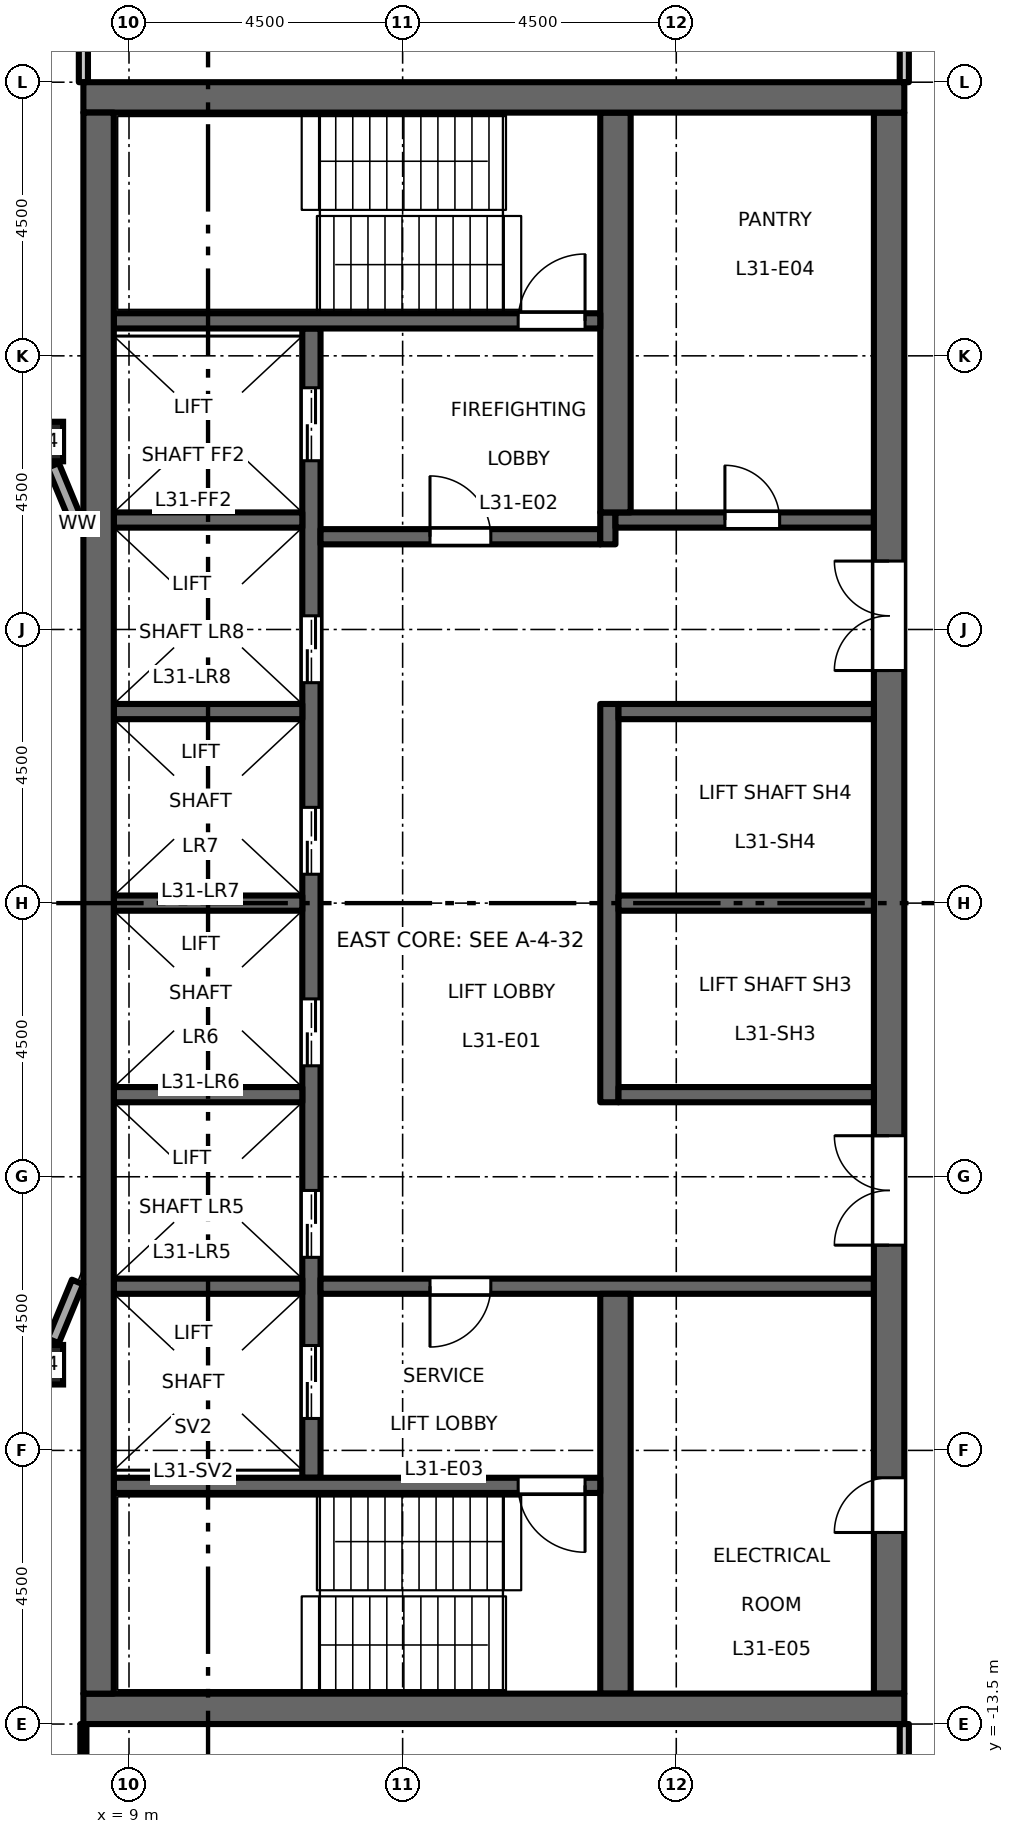
"""IFC4 building model, lengths in metres.
Left out: names, types, materials, properties, quantities, classifications, styles, units other than length and angle.
Written with IfcOpenShell. Run it as: python <this file> out.ifc"""

import sys

from ifc_helpers import new_model, si_unit, direction, frame, frame_2d, origin, origin_2d, place, context, subcontext, project, spatial, rectangle, hollow_rectangle, extrude, element, fill, save


model = new_model("IFC4")
c1 = context("Model", 3, precision=1e-05, world=origin(), true_north=direction((0.0, 1.0)))
c2 = subcontext(c1, "Body", "Model", "MODEL_VIEW")
j1 = project(units=[si_unit("LENGTHUNIT", "METRE"), si_unit("PLANEANGLEUNIT", "RADIAN")], contexts=[c1])
p1 = place(None, origin())
s1 = spatial("IfcSite", under=j1, at=p1, CompositionType="ELEMENT")
p2 = place(p1, origin())
s2 = spatial("IfcBuilding", under=s1, at=p2, CompositionType="ELEMENT")
p3 = place(p2, frame((0.0, 0.0, 145.2)))
s3 = spatial("IfcBuildingStorey", under=s2, at=p3, CompositionType="ELEMENT", Elevation=145.2)
for number, where, z_axis, x_axis in (
    (1, (7.591, -7.591, 0.0), (0.0, 0.0, 1.0), (1.0, 0.0, 0.0)),
    (2, (7.591, 7.591, 0.0), (0.0, 0.0, 1.0), (1.0, 0.0, 0.0)),
):
    element("IfcColumn", number, at=place(p3, frame(where, z_axis=z_axis, x_axis=x_axis)), inside=s3, PredefinedType="COLUMN", context=c2, shape_type="SweptSolid", body=[
        extrude(hollow_rectangle(XDim=0.65, YDim=0.65, WallThickness=0.036, at=origin_2d()), origin(), (0.0, 0.0, 1.0), 4.5),
    ])
p4 = place(p3, frame((12.0, -9.45, 0.0), z_axis=(0.0, 0.0, 1.0), x_axis=(0.0, 1.0, 0.0)))
e3 = element("IfcWall", 3, at=p4, inside=s3, PredefinedType="SHEAR", context=c2, shape_type="SweptSolid", body=[
    extrude(rectangle(XDim=18.9, YDim=0.3, at=frame_2d((9.45, 0.0))), origin(), (0.0, 0.0, 1.0), 4.35),
])
p5 = place(p4, frame((3.625, 0.0, 0.0)))
e4 = element("IfcOpeningElement", 4, at=p5, cuts=e3, PredefinedType="OPENING", context=c2, shape_type="SweptSolid", body=[
    extrude(rectangle(XDim=1.1, YDim=2.1, at=frame_2d((0.55, 1.05))), frame((0.0, 0.16, 0.0), z_axis=(0.0, -1.0, 0.0), x_axis=(1.0, 0.0, 0.0)), (0.0, 0.0, 1.0), 0.32),
])
p6 = place(p4, frame((6.775, 0.0, 0.0)))
e5 = element("IfcOpeningElement", 5, at=p6, cuts=e3, PredefinedType="OPENING", context=c2, shape_type="SweptSolid", body=[
    extrude(rectangle(XDim=1.1, YDim=2.1, at=frame_2d((0.55, 1.05))), frame((0.0, 0.16, 0.0), z_axis=(0.0, -1.0, 0.0), x_axis=(1.0, 0.0, 0.0)), (0.0, 0.0, 1.0), 0.32),
])
p7 = place(p4, frame((9.925, 0.0, 0.0)))
e6 = element("IfcOpeningElement", 6, at=p7, cuts=e3, PredefinedType="OPENING", context=c2, shape_type="SweptSolid", body=[
    extrude(rectangle(XDim=1.1, YDim=2.1, at=frame_2d((0.55, 1.05))), frame((0.0, 0.16, 0.0), z_axis=(0.0, -1.0, 0.0), x_axis=(1.0, 0.0, 0.0)), (0.0, 0.0, 1.0), 0.32),
])
p8 = place(p4, frame((13.075, 0.0, 0.0)))
e7 = element("IfcOpeningElement", 7, at=p8, cuts=e3, PredefinedType="OPENING", context=c2, shape_type="SweptSolid", body=[
    extrude(rectangle(XDim=1.1, YDim=2.1, at=frame_2d((0.55, 1.05))), frame((0.0, 0.16, 0.0), z_axis=(0.0, -1.0, 0.0), x_axis=(1.0, 0.0, 0.0)), (0.0, 0.0, 1.0), 0.32),
])
p9 = place(p4, frame((16.725, 0.0, 0.0)))
e8 = element("IfcOpeningElement", 8, at=p9, cuts=e3, PredefinedType="OPENING", context=c2, shape_type="SweptSolid", body=[
    extrude(rectangle(XDim=1.2, YDim=2.1, at=frame_2d((0.6, 1.05))), frame((0.0, 0.16, 0.0), z_axis=(0.0, -1.0, 0.0), x_axis=(1.0, 0.0, 0.0)), (0.0, 0.0, 1.0), 0.32),
])
p10 = place(p4, frame((0.975, 0.0, 0.0)))
e9 = element("IfcOpeningElement", 9, at=p10, cuts=e3, PredefinedType="OPENING", context=c2, shape_type="SweptSolid", body=[
    extrude(rectangle(XDim=1.2, YDim=2.1, at=frame_2d((0.6, 1.05))), frame((0.0, 0.16, 0.0), z_axis=(0.0, -1.0, 0.0), x_axis=(1.0, 0.0, 0.0)), (0.0, 0.0, 1.0), 0.32),
])
p11 = place(p3, frame((12.15, 6.025, 0.0), z_axis=(0.0, 0.0, 1.0), x_axis=(1.0, 0.0, 0.0)))
e10 = element("IfcWall", 10, at=p11, inside=s3, PredefinedType="SHEAR", context=c2, shape_type="SweptSolid", body=[
    extrude(rectangle(XDim=4.6, YDim=0.25, at=frame_2d((2.3, 0.0))), origin(), (0.0, 0.0, 1.0), 4.35),
])
p12 = place(p11, frame((1.8, 0.0, 0.0)))
e11 = element("IfcOpeningElement", 11, at=p12, cuts=e10, PredefinedType="OPENING", context=c2, shape_type="SweptSolid", body=[
    extrude(rectangle(XDim=1.0, YDim=2.1, at=frame_2d((0.5, 1.05))), frame((0.0, 0.135, 0.0), z_axis=(0.0, -1.0, 0.0), x_axis=(1.0, 0.0, 0.0)), (0.0, 0.0, 1.0), 0.27),
])
p13 = place(p3, frame((16.875, 5.9, 0.0), z_axis=(0.0, 0.0, 1.0), x_axis=(0.0, 1.0, 0.0)))
e12 = element("IfcWall", 12, at=p13, inside=s3, PredefinedType="SHEAR", context=c2, shape_type="SweptSolid", body=[
    extrude(rectangle(XDim=0.525, YDim=0.25, at=frame_2d((0.263, 0.0))), origin(), (0.0, 0.0, 1.0), 4.35),
])
p14 = place(p3, frame((17.0, 6.3, 0.0), z_axis=(0.0, 0.0, 1.0), x_axis=(1.0, 0.0, 0.0)))
e13 = element("IfcWall", 13, at=p14, inside=s3, PredefinedType="SHEAR", context=c2, shape_type="SweptSolid", body=[
    extrude(rectangle(XDim=4.25, YDim=0.25, at=frame_2d((2.125, 0.0))), origin(), (0.0, 0.0, 1.0), 4.35),
])
p15 = place(p14, frame((1.8, 0.0, 0.0)))
e14 = element("IfcOpeningElement", 14, at=p15, cuts=e13, PredefinedType="OPENING", context=c2, shape_type="SweptSolid", body=[
    extrude(rectangle(XDim=0.9, YDim=2.1, at=frame_2d((0.45, 1.05))), frame((0.0, 0.135, 0.0), z_axis=(0.0, -1.0, 0.0), x_axis=(1.0, 0.0, 0.0)), (0.0, 0.0, 1.0), 0.27),
])
p16 = place(p3, frame((12.15, -6.3, 0.0), z_axis=(0.0, 0.0, 1.0), x_axis=(1.0, 0.0, 0.0)))
e15 = element("IfcWall", 15, at=p16, inside=s3, PredefinedType="SHEAR", context=c2, shape_type="SweptSolid", body=[
    extrude(rectangle(XDim=9.1, YDim=0.25, at=frame_2d((4.55, 0.0))), origin(), (0.0, 0.0, 1.0), 4.35),
])
p17 = place(p16, frame((1.8, 0.0, 0.0)))
e16 = element("IfcOpeningElement", 16, at=p17, cuts=e15, PredefinedType="OPENING", context=c2, shape_type="SweptSolid", body=[
    extrude(rectangle(XDim=1.0, YDim=2.1, at=frame_2d((0.5, 1.05))), frame((0.0, 0.135, 0.0), z_axis=(0.0, -1.0, 0.0), x_axis=(1.0, 0.0, 0.0)), (0.0, 0.0, 1.0), 0.27),
])
p18 = place(p3, frame((21.5, -13.0, 0.0), z_axis=(0.0, 0.0, 1.0), x_axis=(0.0, 1.0, 0.0)))
e17 = element("IfcWall", 17, at=p18, inside=s3, PredefinedType="SHEAR", context=c2, shape_type="SweptSolid", body=[
    extrude(rectangle(XDim=26.0, YDim=0.5, at=frame_2d((13.0, 0.0))), origin(), (0.0, 0.0, 1.0), 4.35),
])
p19 = place(p18, frame((16.825, 0.0, 0.0)))
e18 = element("IfcOpeningElement", 18, at=p19, cuts=e17, PredefinedType="OPENING", context=c2, shape_type="SweptSolid", body=[
    extrude(rectangle(XDim=1.8, YDim=2.1, at=frame_2d((0.9, 1.05))), frame((0.0, 0.26, 0.0), z_axis=(0.0, -1.0, 0.0), x_axis=(1.0, 0.0, 0.0)), (0.0, 0.0, 1.0), 0.52),
])
p20 = place(p18, frame((7.375, 0.0, 0.0)))
e19 = element("IfcOpeningElement", 19, at=p20, cuts=e17, PredefinedType="OPENING", context=c2, shape_type="SweptSolid", body=[
    extrude(rectangle(XDim=1.8, YDim=2.1, at=frame_2d((0.9, 1.05))), frame((0.0, 0.26, 0.0), z_axis=(0.0, -1.0, 0.0), x_axis=(1.0, 0.0, 0.0)), (0.0, 0.0, 1.0), 0.52),
])
p21 = place(p18, frame((2.65, 0.0, 0.0)))
e20 = element("IfcOpeningElement", 20, at=p21, cuts=e17, PredefinedType="OPENING", context=c2, shape_type="SweptSolid", body=[
    extrude(rectangle(XDim=0.9, YDim=2.1, at=frame_2d((0.45, 1.05))), frame((0.0, 0.26, 0.0), z_axis=(0.0, -1.0, 0.0), x_axis=(1.0, 0.0, 0.0)), (0.0, 0.0, 1.0), 0.52),
])
p22 = place(p3, frame((16.9, -3.275, 0.0), z_axis=(0.0, 0.0, 1.0), x_axis=(0.0, 1.0, 0.0)))
e21 = element("IfcWall", 21, at=p22, inside=s3, PredefinedType="SHEAR", context=c2, shape_type="SweptSolid", body=[
    extrude(rectangle(XDim=6.55, YDim=0.3, at=frame_2d((3.275, 0.0))), origin(), (0.0, 0.0, 1.0), 4.35),
])
for number, where, z_axis, x_axis in (
    (22, (17.05, 0.0, 0.0), (0.0, 0.0, 1.0), (1.0, 0.0, 0.0)),
    (23, (17.05, 3.15, 0.0), (0.0, 0.0, 1.0), (1.0, 0.0, 0.0)),
    (24, (17.05, -3.15, 0.0), (0.0, 0.0, 1.0), (1.0, 0.0, 0.0)),
):
    element("IfcWall", number, at=place(p3, frame(where, z_axis=z_axis, x_axis=x_axis)), inside=s3, PredefinedType="SHEAR", context=c2, shape_type="SweptSolid", body=[
        extrude(rectangle(XDim=4.2, YDim=0.25, at=frame_2d((2.1, 0.0))), origin(), (0.0, 0.0, 1.0), 4.35),
    ])
for number, where, z_axis, x_axis in (
    (25, (17.0, 6.425, 0.0), (0.0, 0.0, 1.0), (0.0, 1.0, 0.0)),
    (26, (17.0, -13.0, 0.0), (0.0, 0.0, 1.0), (0.0, 1.0, 0.0)),
):
    element("IfcWall", number, at=place(p3, frame(where, z_axis=z_axis, x_axis=x_axis)), inside=s3, PredefinedType="SHEAR", context=c2, shape_type="SweptSolid", body=[
        extrude(rectangle(XDim=6.575, YDim=0.5, at=frame_2d((3.288, 0.0))), origin(), (0.0, 0.0, 1.0), 4.35),
    ])
for number, where, z_axis, x_axis in (
    (27, (8.75, 0.0, 0.0), (0.0, 0.0, 1.0), (1.0, 0.0, 0.0)),
    (28, (8.75, 3.15, 0.0), (0.0, 0.0, 1.0), (1.0, 0.0, 0.0)),
    (29, (8.75, 6.3, 0.0), (0.0, 0.0, 1.0), (1.0, 0.0, 0.0)),
    (30, (8.75, -3.15, 0.0), (0.0, 0.0, 1.0), (1.0, 0.0, 0.0)),
    (31, (8.75, -6.3, 0.0), (0.0, 0.0, 1.0), (1.0, 0.0, 0.0)),
):
    element("IfcWall", number, at=place(p3, frame(where, z_axis=z_axis, x_axis=x_axis)), inside=s3, PredefinedType="SHEAR", context=c2, shape_type="SweptSolid", body=[
        extrude(rectangle(XDim=3.1, YDim=0.25, at=frame_2d((1.55, 0.0))), origin(), (0.0, 0.0, 1.0), 4.35),
    ])
p23 = place(p3, frame((8.75, 9.575, 0.0), z_axis=(0.0, 0.0, 1.0), x_axis=(1.0, 0.0, 0.0)))
e32 = element("IfcWall", 32, at=p23, inside=s3, PredefinedType="SHEAR", context=c2, shape_type="SweptSolid", body=[
    extrude(rectangle(XDim=8.0, YDim=0.25, at=frame_2d((4.0, 0.0))), origin(), (0.0, 0.0, 1.0), 4.35),
])
p24 = place(p23, frame((6.65, 0.0, 0.0)))
e33 = element("IfcOpeningElement", 33, at=p24, cuts=e32, PredefinedType="OPENING", context=c2, shape_type="SweptSolid", body=[
    extrude(rectangle(XDim=1.1, YDim=2.1, at=frame_2d((0.55, 1.05))), frame((0.0, 0.135, 0.0), z_axis=(0.0, -1.0, 0.0), x_axis=(1.0, 0.0, 0.0)), (0.0, 0.0, 1.0), 0.27),
])
p25 = place(p3, frame((8.75, -9.575, 0.0), z_axis=(0.0, 0.0, 1.0), x_axis=(1.0, 0.0, 0.0)))
e34 = element("IfcWall", 34, at=p25, inside=s3, PredefinedType="SHEAR", context=c2, shape_type="SweptSolid", body=[
    extrude(rectangle(XDim=8.0, YDim=0.25, at=frame_2d((4.0, 0.0))), origin(), (0.0, 0.0, 1.0), 4.35),
])
p26 = place(p25, frame((6.65, 0.0, 0.0)))
e35 = element("IfcOpeningElement", 35, at=p26, cuts=e34, PredefinedType="OPENING", context=c2, shape_type="SweptSolid", body=[
    extrude(rectangle(XDim=1.1, YDim=2.1, at=frame_2d((0.55, 1.05))), frame((0.0, 0.135, 0.0), z_axis=(0.0, -1.0, 0.0), x_axis=(1.0, 0.0, 0.0)), (0.0, 0.0, 1.0), 0.27),
])
for number, where, z_axis, x_axis in (
    (36, (8.25, 13.25, 0.0), (0.0, 0.0, 1.0), (1.0, 0.0, 0.0)),
    (37, (8.25, -13.25, 0.0), (0.0, 0.0, 1.0), (1.0, 0.0, 0.0)),
):
    element("IfcWall", number, at=place(p3, frame(where, z_axis=z_axis, x_axis=x_axis)), inside=s3, PredefinedType="SHEAR", context=c2, shape_type="SweptSolid", body=[
        extrude(rectangle(XDim=13.5, YDim=0.5, at=frame_2d((6.75, 0.0))), origin(), (0.0, 0.0, 1.0), 4.35),
    ])
p27 = place(p3, frame((8.5, -13.0, 0.0), z_axis=(0.0, 0.0, 1.0), x_axis=(0.0, 1.0, 0.0)))
e38 = element("IfcWall", 38, at=p27, inside=s3, PredefinedType="SHEAR", context=c2, shape_type="SweptSolid", body=[
    extrude(rectangle(XDim=26.0, YDim=0.5, at=frame_2d((13.0, 0.0))), origin(), (0.0, 0.0, 1.0), 4.35),
])
for number, where, z_axis, x_axis in (
    (39, (7.753, -7.199, 0.0), (0.0, 0.0, 1.0), (0.383, 0.924, 0.0)),
    (40, (8.154, 6.231, 0.0), (0.0, 0.0, 1.0), (-0.383, 0.924, 0.0)),
):
    element("IfcWall", number, at=place(p3, frame(where, z_axis=z_axis, x_axis=x_axis)), inside=s3, PredefinedType="STANDARD", context=c2, shape_type="SweptSolid", body=[
        extrude(rectangle(XDim=1.048, YDim=0.2, at=frame_2d((0.524, 0.0))), origin(), (0.0, 0.0, 1.0), 3.826),
    ])
p28 = place(p3, frame((8.25, -16.925, 0.0), z_axis=(0.0, 0.0, 1.0), x_axis=(0.0, 1.0, 0.0)))
e41 = element("IfcWall", 41, at=p28, inside=s3, PredefinedType="PARTITIONING", context=c2, shape_type="SweptSolid", body=[
    extrude(rectangle(XDim=3.425, YDim=0.1, at=frame_2d((1.712, 0.0))), origin(), (0.0, 0.0, 1.0), 4.35),
])
p29 = place(p3, frame((8.25, 13.5, 0.0), z_axis=(0.0, 0.0, 1.0), x_axis=(0.0, 1.0, 0.0)))
e42 = element("IfcWall", 42, at=p29, inside=s3, PredefinedType="PARTITIONING", context=c2, shape_type="SweptSolid", body=[
    extrude(rectangle(XDim=1.3, YDim=0.15, at=frame_2d((0.65, 0.0))), origin(), (0.0, 0.0, 1.0), 4.35),
])
for number, where, z_axis, x_axis in (
    (43, (21.75, -16.925, 0.0), (0.0, 0.0, 1.0), (0.0, 1.0, 0.0)),
    (44, (21.75, 13.5, 0.0), (0.0, 0.0, 1.0), (0.0, 1.0, 0.0)),
):
    element("IfcWall", number, at=place(p3, frame(where, z_axis=z_axis, x_axis=x_axis)), inside=s3, PredefinedType="PARTITIONING", context=c2, shape_type="SweptSolid", body=[
        extrude(rectangle(XDim=3.425, YDim=0.15, at=frame_2d((1.712, 0.0))), origin(), (0.0, 0.0, 1.0), 4.35),
    ])
p30 = place(p12, origin())
e45 = element("IfcDoor", 45, at=p30, inside=s3, OperationType="SINGLE_SWING_RIGHT", PredefinedType="DOOR", context=c2, shape_type="SweptSolid", body=[
    extrude(rectangle(XDim=1.0, YDim=2.1, at=frame_2d((0.5, 1.05))), frame((0.0, 0.025, 0.0), z_axis=(0.0, -1.0, 0.0), x_axis=(1.0, 0.0, 0.0)), (0.0, 0.0, 1.0), 0.05),
])
fill(e11, e45)
p31 = place(p17, origin())
e46 = element("IfcDoor", 46, at=p31, inside=s3, OperationType="SINGLE_SWING_LEFT", PredefinedType="DOOR", context=c2, shape_type="SweptSolid", body=[
    extrude(rectangle(XDim=1.0, YDim=2.1, at=frame_2d((0.5, 1.05))), frame((0.0, 0.025, 0.0), z_axis=(0.0, -1.0, 0.0), x_axis=(1.0, 0.0, 0.0)), (0.0, 0.0, 1.0), 0.05),
])
fill(e16, e46)
p32 = place(p24, origin())
e47 = element("IfcDoor", 47, at=p32, inside=s3, OperationType="SINGLE_SWING_LEFT", PredefinedType="DOOR", context=c2, shape_type="SweptSolid", body=[
    extrude(rectangle(XDim=1.1, YDim=2.1, at=frame_2d((0.55, 1.05))), frame((0.0, 0.025, 0.0), z_axis=(0.0, -1.0, 0.0), x_axis=(1.0, 0.0, 0.0)), (0.0, 0.0, 1.0), 0.05),
])
fill(e33, e47)
p33 = place(p26, origin())
e48 = element("IfcDoor", 48, at=p33, inside=s3, OperationType="SINGLE_SWING_RIGHT", PredefinedType="DOOR", context=c2, shape_type="SweptSolid", body=[
    extrude(rectangle(XDim=1.1, YDim=2.1, at=frame_2d((0.55, 1.05))), frame((0.0, 0.025, 0.0), z_axis=(0.0, -1.0, 0.0), x_axis=(1.0, 0.0, 0.0)), (0.0, 0.0, 1.0), 0.05),
])
fill(e35, e48)
p34 = place(p19, origin())
e49 = element("IfcDoor", 49, at=p34, inside=s3, OperationType="DOUBLE_DOOR_DOUBLE_SWING", PredefinedType="DOOR", context=c2, shape_type="SweptSolid", body=[
    extrude(rectangle(XDim=1.8, YDim=2.1, at=frame_2d((0.9, 1.05))), frame((0.0, 0.025, 0.0), z_axis=(0.0, -1.0, 0.0), x_axis=(1.0, 0.0, 0.0)), (0.0, 0.0, 1.0), 0.05),
])
fill(e18, e49)
p35 = place(p20, origin())
e50 = element("IfcDoor", 50, at=p35, inside=s3, OperationType="DOUBLE_DOOR_DOUBLE_SWING", PredefinedType="DOOR", context=c2, shape_type="SweptSolid", body=[
    extrude(rectangle(XDim=1.8, YDim=2.1, at=frame_2d((0.9, 1.05))), frame((0.0, 0.025, 0.0), z_axis=(0.0, -1.0, 0.0), x_axis=(1.0, 0.0, 0.0)), (0.0, 0.0, 1.0), 0.05),
])
fill(e19, e50)
p36 = place(p5, origin())
e51 = element("IfcDoor", 51, at=p36, inside=s3, OperationType="DOUBLE_DOOR_SLIDING", PredefinedType="DOOR", context=c2, shape_type="SweptSolid", body=[
    extrude(rectangle(XDim=1.1, YDim=2.1, at=frame_2d((0.55, 1.05))), frame((0.0, 0.025, 0.0), z_axis=(0.0, -1.0, 0.0), x_axis=(1.0, 0.0, 0.0)), (0.0, 0.0, 1.0), 0.05),
])
fill(e4, e51)
p37 = place(p6, origin())
e52 = element("IfcDoor", 52, at=p37, inside=s3, OperationType="DOUBLE_DOOR_SLIDING", PredefinedType="DOOR", context=c2, shape_type="SweptSolid", body=[
    extrude(rectangle(XDim=1.1, YDim=2.1, at=frame_2d((0.55, 1.05))), frame((0.0, 0.025, 0.0), z_axis=(0.0, -1.0, 0.0), x_axis=(1.0, 0.0, 0.0)), (0.0, 0.0, 1.0), 0.05),
])
fill(e5, e52)
p38 = place(p7, origin())
e53 = element("IfcDoor", 53, at=p38, inside=s3, OperationType="DOUBLE_DOOR_SLIDING", PredefinedType="DOOR", context=c2, shape_type="SweptSolid", body=[
    extrude(rectangle(XDim=1.1, YDim=2.1, at=frame_2d((0.55, 1.05))), frame((0.0, 0.025, 0.0), z_axis=(0.0, -1.0, 0.0), x_axis=(1.0, 0.0, 0.0)), (0.0, 0.0, 1.0), 0.05),
])
fill(e6, e53)
p39 = place(p8, origin())
e54 = element("IfcDoor", 54, at=p39, inside=s3, OperationType="DOUBLE_DOOR_SLIDING", PredefinedType="DOOR", context=c2, shape_type="SweptSolid", body=[
    extrude(rectangle(XDim=1.1, YDim=2.1, at=frame_2d((0.55, 1.05))), frame((0.0, 0.025, 0.0), z_axis=(0.0, -1.0, 0.0), x_axis=(1.0, 0.0, 0.0)), (0.0, 0.0, 1.0), 0.05),
])
fill(e7, e54)
p40 = place(p9, origin())
e55 = element("IfcDoor", 55, at=p40, inside=s3, OperationType="DOUBLE_DOOR_SLIDING", PredefinedType="DOOR", context=c2, shape_type="SweptSolid", body=[
    extrude(rectangle(XDim=1.2, YDim=2.1, at=frame_2d((0.6, 1.05))), frame((0.0, 0.025, 0.0), z_axis=(0.0, -1.0, 0.0), x_axis=(1.0, 0.0, 0.0)), (0.0, 0.0, 1.0), 0.05),
])
fill(e8, e55)
p41 = place(p10, origin())
e56 = element("IfcDoor", 56, at=p41, inside=s3, OperationType="DOUBLE_DOOR_SLIDING", PredefinedType="DOOR", context=c2, shape_type="SweptSolid", body=[
    extrude(rectangle(XDim=1.2, YDim=2.1, at=frame_2d((0.6, 1.05))), frame((0.0, 0.025, 0.0), z_axis=(0.0, -1.0, 0.0), x_axis=(1.0, 0.0, 0.0)), (0.0, 0.0, 1.0), 0.05),
])
fill(e9, e56)
p42 = place(p15, origin())
e57 = element("IfcDoor", 57, at=p42, inside=s3, OperationType="SINGLE_SWING_RIGHT", PredefinedType="DOOR", context=c2, shape_type="SweptSolid", body=[
    extrude(rectangle(XDim=0.9, YDim=2.1, at=frame_2d((0.45, 1.05))), frame((0.0, 0.025, 0.0), z_axis=(0.0, -1.0, 0.0), x_axis=(1.0, 0.0, 0.0)), (0.0, 0.0, 1.0), 0.05),
])
fill(e14, e57)
p43 = place(p21, origin())
e58 = element("IfcDoor", 58, at=p43, inside=s3, OperationType="SINGLE_SWING_RIGHT", PredefinedType="DOOR", context=c2, shape_type="SweptSolid", body=[
    extrude(rectangle(XDim=0.9, YDim=2.1, at=frame_2d((0.45, 1.05))), frame((0.0, 0.025, 0.0), z_axis=(0.0, -1.0, 0.0), x_axis=(1.0, 0.0, 0.0)), (0.0, 0.0, 1.0), 0.05),
])
fill(e20, e58)
save(model, sys.argv[1])
